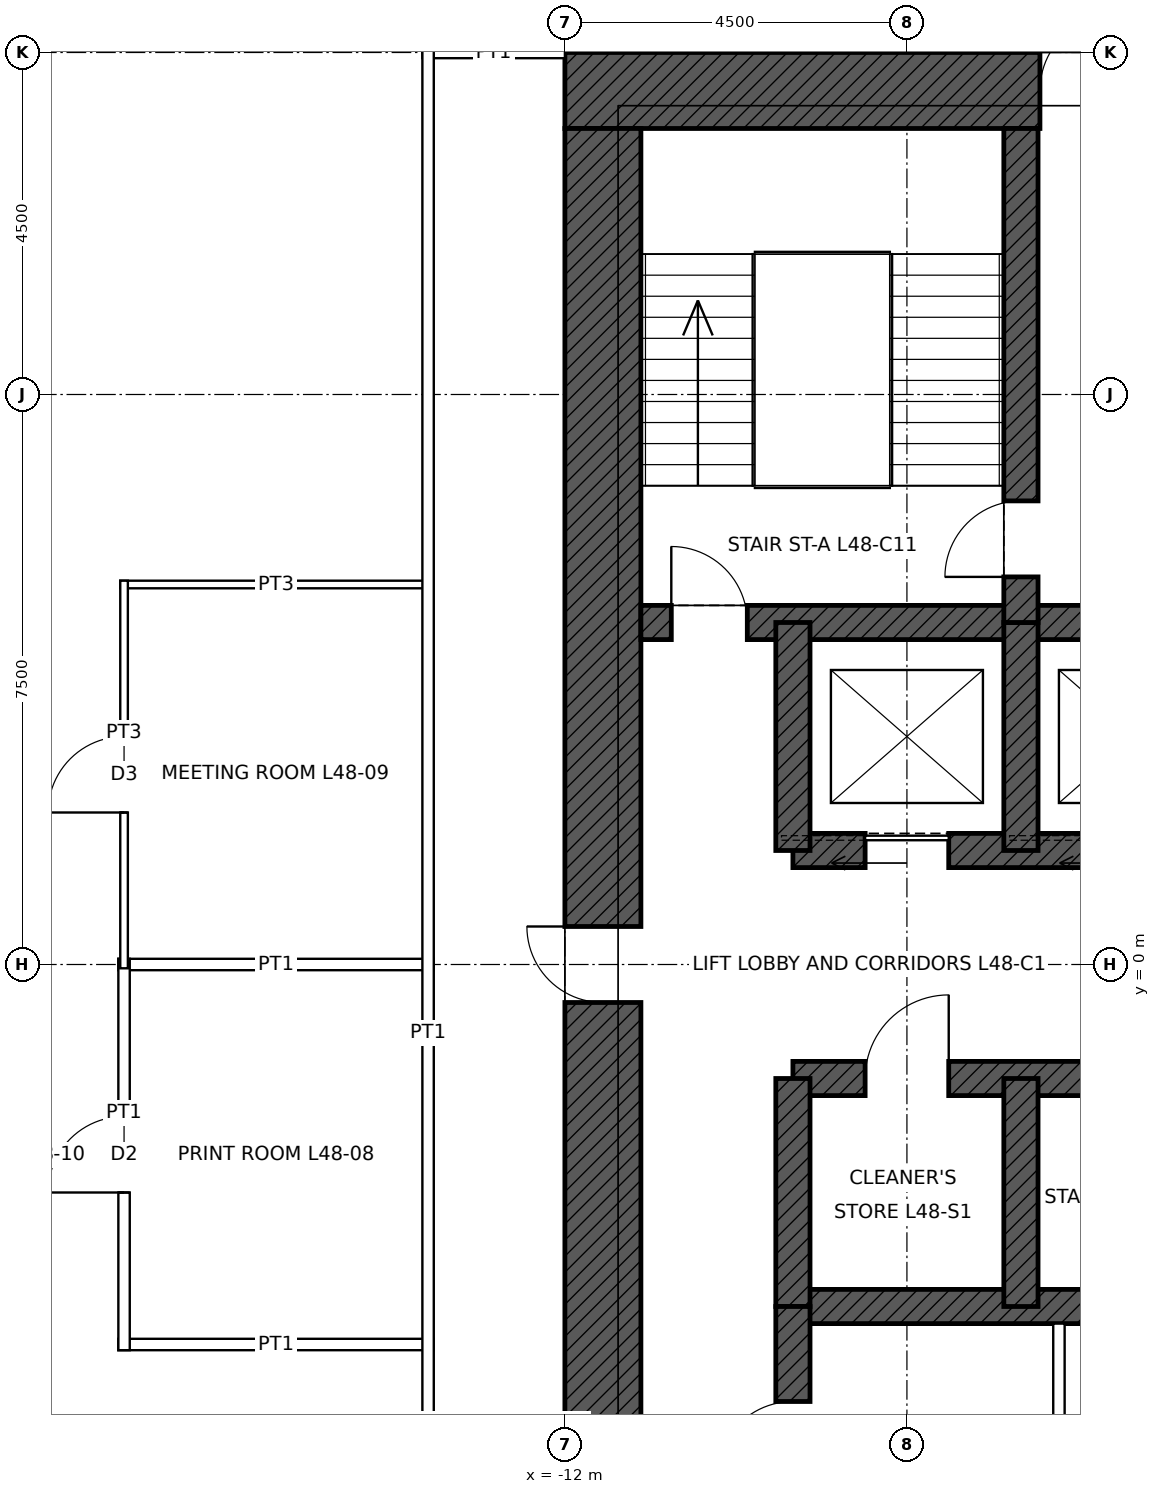
"""IFC4 building model, lengths in metres.
Left out: names, types, materials, properties, quantities, classifications, styles, units other than length and angle.
Written with IfcOpenShell. Run it as: python <this file> out.ifc"""

import sys

from ifc_helpers import new_model, si_unit, direction, frame, frame_2d, origin, place, context, subcontext, project, spatial, rectangle, extrude, element, fill, save


model = new_model("IFC4")
c1 = context("Model", 3, precision=1e-05, world=origin(), true_north=direction((0.0, 1.0)))
c2 = subcontext(c1, "Body", "Model", "MODEL_VIEW")
j1 = project(units=[si_unit("LENGTHUNIT", "METRE"), si_unit("PLANEANGLEUNIT", "RADIAN")], contexts=[c1])
p1 = place(None, origin())
s1 = spatial("IfcSite", under=j1, at=p1, CompositionType="ELEMENT")
p2 = place(p1, origin())
s2 = spatial("IfcBuilding", under=s1, at=p2, CompositionType="ELEMENT")
p3 = place(p2, frame((0.0, 0.0, 225.9)))
s3 = spatial("IfcBuildingStorey", under=s2, at=p3, CompositionType="ELEMENT", Elevation=225.9)
p4 = place(p3, frame((-12.0, 11.5, 0.0), z_axis=(0.0, 0.0, 1.0), x_axis=(1.0, 0.0, 0.0)))
e1 = element("IfcWall", 1, at=p4, inside=s3, PredefinedType="SHEAR", context=c2, shape_type="SweptSolid", body=[
    extrude(rectangle(XDim=24.0, YDim=1.0, at=frame_2d((12.0, 0.0))), origin(), (0.0, 0.0, 1.0), 4.0),
])
p5 = place(p4, frame((6.25, 0.0, 0.0)))
e2 = element("IfcOpeningElement", 2, at=p5, cuts=e1, PredefinedType="OPENING", context=c2, shape_type="SweptSolid", body=[
    extrude(rectangle(XDim=1.0, YDim=2.4, at=frame_2d((0.5, 1.2))), frame((0.0, 0.51, 0.0), z_axis=(0.0, -1.0, 0.0), x_axis=(1.0, 0.0, 0.0)), (0.0, 0.0, 1.0), 1.02),
])
p6 = place(p4, frame((16.75, 0.0, 0.0)))
e3 = element("IfcOpeningElement", 3, at=p6, cuts=e1, PredefinedType="OPENING", context=c2, shape_type="SweptSolid", body=[
    extrude(rectangle(XDim=1.0, YDim=2.4, at=frame_2d((0.5, 1.2))), frame((0.0, 0.51, 0.0), z_axis=(0.0, -1.0, 0.0), x_axis=(1.0, 0.0, 0.0)), (0.0, 0.0, 1.0), 1.02),
])
p7 = place(p3, frame((-11.5, -11.0, 0.0), z_axis=(0.0, 0.0, 1.0), x_axis=(0.0, 1.0, 0.0)))
e4 = element("IfcWall", 4, at=p7, inside=s3, PredefinedType="SHEAR", context=c2, shape_type="SweptSolid", body=[
    extrude(rectangle(XDim=22.0, YDim=1.0, at=frame_2d((11.0, 0.0))), origin(), (0.0, 0.0, 1.0), 4.0),
])
p8 = place(p7, frame((10.5, 0.0, 0.0)))
e5 = element("IfcOpeningElement", 5, at=p8, cuts=e4, PredefinedType="OPENING", context=c2, shape_type="SweptSolid", body=[
    extrude(rectangle(XDim=1.0, YDim=2.4, at=frame_2d((0.5, 1.2))), frame((0.0, 0.51, 0.0), z_axis=(0.0, -1.0, 0.0), x_axis=(1.0, 0.0, 0.0)), (0.0, 0.0, 1.0), 1.02),
])
p9 = place(p3, frame((-11.0, 4.5, 0.0), z_axis=(0.0, 0.0, 1.0), x_axis=(1.0, 0.0, 0.0)))
e6 = element("IfcWall", 6, at=p9, inside=s3, PredefinedType="SHEAR", context=c2, shape_type="SweptSolid", body=[
    extrude(rectangle(XDim=22.0, YDim=0.45, at=frame_2d((11.0, 0.0))), origin(), (0.0, 0.0, 1.0), 4.0),
])
p10 = place(p9, frame((0.4, 0.0, 0.0)))
e7 = element("IfcOpeningElement", 7, at=p10, cuts=e6, PredefinedType="OPENING", context=c2, shape_type="SweptSolid", body=[
    extrude(rectangle(XDim=1.0, YDim=2.1, at=frame_2d((0.5, 1.05))), frame((0.0, 0.235, 0.0), z_axis=(0.0, -1.0, 0.0), x_axis=(1.0, 0.0, 0.0)), (0.0, 0.0, 1.0), 0.47),
])
p11 = place(p9, frame((20.6, 0.0, 0.0)))
e8 = element("IfcOpeningElement", 8, at=p11, cuts=e6, PredefinedType="OPENING", context=c2, shape_type="SweptSolid", body=[
    extrude(rectangle(XDim=1.0, YDim=2.1, at=frame_2d((0.5, 1.05))), frame((0.0, 0.235, 0.0), z_axis=(0.0, -1.0, 0.0), x_axis=(1.0, 0.0, 0.0)), (0.0, 0.0, 1.0), 0.47),
])
p12 = place(p3, frame((-9.0, 1.5, 0.0), z_axis=(0.0, 0.0, 1.0), x_axis=(1.0, 0.0, 0.0)))
e9 = element("IfcWall", 9, at=p12, inside=s3, PredefinedType="SHEAR", context=c2, shape_type="SweptSolid", body=[
    extrude(rectangle(XDim=18.0, YDim=0.45, at=frame_2d((9.0, 0.0))), origin(), (0.0, 0.0, 1.0), 4.0),
])
p13 = place(p12, frame((0.95, 0.0, 0.0)))
e10 = element("IfcOpeningElement", 10, at=p13, cuts=e9, PredefinedType="OPENING", context=c2, shape_type="SweptSolid", body=[
    extrude(rectangle(XDim=1.1, YDim=2.1, at=frame_2d((0.55, 1.05))), frame((0.0, 0.235, 0.0), z_axis=(0.0, -1.0, 0.0), x_axis=(1.0, 0.0, 0.0)), (0.0, 0.0, 1.0), 0.47),
])
p14 = place(p12, frame((3.95, 0.0, 0.0)))
e11 = element("IfcOpeningElement", 11, at=p14, cuts=e9, PredefinedType="OPENING", context=c2, shape_type="SweptSolid", body=[
    extrude(rectangle(XDim=1.1, YDim=2.1, at=frame_2d((0.55, 1.05))), frame((0.0, 0.235, 0.0), z_axis=(0.0, -1.0, 0.0), x_axis=(1.0, 0.0, 0.0)), (0.0, 0.0, 1.0), 0.47),
])
p15 = place(p12, frame((6.95, 0.0, 0.0)))
e12 = element("IfcOpeningElement", 12, at=p15, cuts=e9, PredefinedType="OPENING", context=c2, shape_type="SweptSolid", body=[
    extrude(rectangle(XDim=1.1, YDim=2.1, at=frame_2d((0.55, 1.05))), frame((0.0, 0.235, 0.0), z_axis=(0.0, -1.0, 0.0), x_axis=(1.0, 0.0, 0.0)), (0.0, 0.0, 1.0), 0.47),
])
p16 = place(p12, frame((9.95, 0.0, 0.0)))
e13 = element("IfcOpeningElement", 13, at=p16, cuts=e9, PredefinedType="OPENING", context=c2, shape_type="SweptSolid", body=[
    extrude(rectangle(XDim=1.1, YDim=2.1, at=frame_2d((0.55, 1.05))), frame((0.0, 0.235, 0.0), z_axis=(0.0, -1.0, 0.0), x_axis=(1.0, 0.0, 0.0)), (0.0, 0.0, 1.0), 0.47),
])
p17 = place(p12, frame((12.95, 0.0, 0.0)))
e14 = element("IfcOpeningElement", 14, at=p17, cuts=e9, PredefinedType="OPENING", context=c2, shape_type="SweptSolid", body=[
    extrude(rectangle(XDim=1.1, YDim=2.1, at=frame_2d((0.55, 1.05))), frame((0.0, 0.235, 0.0), z_axis=(0.0, -1.0, 0.0), x_axis=(1.0, 0.0, 0.0)), (0.0, 0.0, 1.0), 0.47),
])
p18 = place(p12, frame((15.95, 0.0, 0.0)))
e15 = element("IfcOpeningElement", 15, at=p18, cuts=e9, PredefinedType="OPENING", context=c2, shape_type="SweptSolid", body=[
    extrude(rectangle(XDim=1.1, YDim=2.1, at=frame_2d((0.55, 1.05))), frame((0.0, 0.235, 0.0), z_axis=(0.0, -1.0, 0.0), x_axis=(1.0, 0.0, 0.0)), (0.0, 0.0, 1.0), 0.47),
])
p19 = place(p3, frame((-9.0, -1.5, 0.0), z_axis=(0.0, 0.0, 1.0), x_axis=(1.0, 0.0, 0.0)))
e16 = element("IfcWall", 16, at=p19, inside=s3, PredefinedType="SHEAR", context=c2, shape_type="SweptSolid", body=[
    extrude(rectangle(XDim=18.0, YDim=0.45, at=frame_2d((9.0, 0.0))), origin(), (0.0, 0.0, 1.0), 4.0),
])
p20 = place(p19, frame((0.95, 0.0, 0.0)))
e17 = element("IfcOpeningElement", 17, at=p20, cuts=e16, PredefinedType="OPENING", context=c2, shape_type="SweptSolid", body=[
    extrude(rectangle(XDim=1.1, YDim=2.1, at=frame_2d((0.55, 1.05))), frame((0.0, 0.235, 0.0), z_axis=(0.0, -1.0, 0.0), x_axis=(1.0, 0.0, 0.0)), (0.0, 0.0, 1.0), 0.47),
])
p21 = place(p19, frame((3.95, 0.0, 0.0)))
e18 = element("IfcOpeningElement", 18, at=p21, cuts=e16, PredefinedType="OPENING", context=c2, shape_type="SweptSolid", body=[
    extrude(rectangle(XDim=1.1, YDim=2.1, at=frame_2d((0.55, 1.05))), frame((0.0, 0.235, 0.0), z_axis=(0.0, -1.0, 0.0), x_axis=(1.0, 0.0, 0.0)), (0.0, 0.0, 1.0), 0.47),
])
p22 = place(p19, frame((6.95, 0.0, 0.0)))
e19 = element("IfcOpeningElement", 19, at=p22, cuts=e16, PredefinedType="OPENING", context=c2, shape_type="SweptSolid", body=[
    extrude(rectangle(XDim=1.1, YDim=2.1, at=frame_2d((0.55, 1.05))), frame((0.0, 0.235, 0.0), z_axis=(0.0, -1.0, 0.0), x_axis=(1.0, 0.0, 0.0)), (0.0, 0.0, 1.0), 0.47),
])
p23 = place(p3, frame((-9.0, -4.5, 0.0), z_axis=(0.0, 0.0, 1.0), x_axis=(1.0, 0.0, 0.0)))
e20 = element("IfcWall", 20, at=p23, inside=s3, PredefinedType="SHEAR", context=c2, shape_type="SweptSolid", body=[
    extrude(rectangle(XDim=18.0, YDim=0.45, at=frame_2d((9.0, 0.0))), origin(), (0.0, 0.0, 1.0), 4.0),
])
for number, where, z_axis, x_axis in (
    (21, (-9.0, 1.5, 0.0), (0.0, 0.0, 1.0), (0.0, 1.0, 0.0)),
    (22, (-9.0, -4.5, 0.0), (0.0, 0.0, 1.0), (0.0, 1.0, 0.0)),
    (23, (-6.0, 1.5, 0.0), (0.0, 0.0, 1.0), (0.0, 1.0, 0.0)),
    (24, (-6.0, -4.5, 0.0), (0.0, 0.0, 1.0), (0.0, 1.0, 0.0)),
):
    element("IfcWall", number, at=place(p3, frame(where, z_axis=z_axis, x_axis=x_axis)), inside=s3, PredefinedType="SHEAR", context=c2, shape_type="SweptSolid", body=[
        extrude(rectangle(XDim=3.0, YDim=0.45, at=frame_2d((1.5, 0.0))), origin(), (0.0, 0.0, 1.0), 4.0),
    ])
p24 = place(p3, frame((-6.0, 4.5, 0.0), z_axis=(0.0, 0.0, 1.0), x_axis=(0.0, 1.0, 0.0)))
e25 = element("IfcWall", 25, at=p24, inside=s3, PredefinedType="SHEAR", context=c2, shape_type="SweptSolid", body=[
    extrude(rectangle(XDim=6.5, YDim=0.45, at=frame_2d((3.25, 0.0))), origin(), (0.0, 0.0, 1.0), 4.0),
])
p25 = place(p24, frame((0.6, 0.0, 0.0)))
e26 = element("IfcOpeningElement", 26, at=p25, cuts=e25, PredefinedType="OPENING", context=c2, shape_type="SweptSolid", body=[
    extrude(rectangle(XDim=1.0, YDim=2.1, at=frame_2d((0.5, 1.05))), frame((0.0, 0.235, 0.0), z_axis=(0.0, -1.0, 0.0), x_axis=(1.0, 0.0, 0.0)), (0.0, 0.0, 1.0), 0.47),
])
p26 = place(p3, frame((-9.0, -11.0, 0.0), z_axis=(0.0, 0.0, 1.0), x_axis=(0.0, 1.0, 0.0)))
e27 = element("IfcWall", 27, at=p26, inside=s3, PredefinedType="SHEAR", context=c2, shape_type="SweptSolid", body=[
    extrude(rectangle(XDim=6.5, YDim=0.45, at=frame_2d((3.25, 0.0))), origin(), (0.0, 0.0, 1.0), 4.0),
])
p27 = place(p26, frame((4.25, 0.0, 0.0)))
e28 = element("IfcOpeningElement", 28, at=p27, cuts=e27, PredefinedType="OPENING", context=c2, shape_type="SweptSolid", body=[
    extrude(rectangle(XDim=1.0, YDim=2.1, at=frame_2d((0.5, 1.05))), frame((0.0, 0.235, 0.0), z_axis=(0.0, -1.0, 0.0), x_axis=(1.0, 0.0, 0.0)), (0.0, 0.0, 1.0), 0.47),
])
p28 = place(p3, frame((-17.875, -5.0, 0.0), z_axis=(0.0, 0.0, 1.0), x_axis=(1.0, 0.0, 0.0)))
e29 = element("IfcWall", 29, at=p28, inside=s3, PredefinedType="PARTITIONING", context=c2, shape_type="SweptSolid", body=[
    extrude(rectangle(XDim=4.15, YDim=0.15, at=frame_2d((2.075, 0.0))), origin(), (0.0, 0.0, 1.0), 3.85),
])
p29 = place(p3, frame((-17.875, 0.0, 0.0), z_axis=(0.0, 0.0, 1.0), x_axis=(1.0, 0.0, 0.0)))
e30 = element("IfcWall", 30, at=p29, inside=s3, PredefinedType="PARTITIONING", context=c2, shape_type="SweptSolid", body=[
    extrude(rectangle(XDim=4.15, YDim=0.15, at=frame_2d((2.075, 0.0))), origin(), (0.0, 0.0, 1.0), 3.238),
])
p30 = place(p3, frame((-17.85, 5.0, 0.0), z_axis=(0.0, 0.0, 1.0), x_axis=(1.0, 0.0, 0.0)))
e31 = element("IfcWall", 31, at=p30, inside=s3, PredefinedType="PARTITIONING", context=c2, shape_type="SweptSolid", body=[
    extrude(rectangle(XDim=4.1, YDim=0.1, at=frame_2d((2.05, 0.0))), origin(), (0.0, 0.0, 1.0), 3.85),
])
p31 = place(p3, frame((-13.875, 12.0, 0.0), z_axis=(0.0, 0.0, 1.0), x_axis=(1.0, 0.0, 0.0)))
e32 = element("IfcWall", 32, at=p31, inside=s3, PredefinedType="PARTITIONING", context=c2, shape_type="SweptSolid", body=[
    extrude(rectangle(XDim=1.875, YDim=0.15, at=frame_2d((0.938, 0.0))), origin(), (0.0, 0.0, 1.0), 3.85),
])
p32 = place(p3, frame((-17.8, -5.075, 0.0), z_axis=(0.0, 0.0, 1.0), x_axis=(0.0, 1.0, 0.0)))
e33 = element("IfcWall", 33, at=p32, inside=s3, PredefinedType="PARTITIONING", context=c2, shape_type="SweptSolid", body=[
    extrude(rectangle(XDim=5.15, YDim=0.15, at=frame_2d((2.575, 0.0))), origin(), (0.0, 0.0, 1.0), 3.85),
])
p33 = place(p32, frame((2.075, 0.0, 0.0)))
e34 = element("IfcOpeningElement", 34, at=p33, cuts=e33, PredefinedType="OPENING", context=c2, shape_type="SweptSolid", body=[
    extrude(rectangle(XDim=1.0, YDim=2.1, at=frame_2d((0.5, 1.05))), frame((0.0, 0.085, 0.0), z_axis=(0.0, -1.0, 0.0), x_axis=(1.0, 0.0, 0.0)), (0.0, 0.0, 1.0), 0.17),
])
p34 = place(p3, frame((-17.8, -0.05, 0.0), z_axis=(0.0, 0.0, 1.0), x_axis=(0.0, 1.0, 0.0)))
e35 = element("IfcWall", 35, at=p34, inside=s3, PredefinedType="PARTITIONING", context=c2, shape_type="SweptSolid", body=[
    extrude(rectangle(XDim=5.1, YDim=0.1, at=frame_2d((2.55, 0.0))), origin(), (0.0, 0.0, 1.0), 3.85),
])
p35 = place(p34, frame((2.05, 0.0, 0.0)))
e36 = element("IfcOpeningElement", 36, at=p35, cuts=e35, PredefinedType="OPENING", context=c2, shape_type="SweptSolid", body=[
    extrude(rectangle(XDim=1.0, YDim=2.1, at=frame_2d((0.5, 1.05))), frame((0.0, 0.06, 0.0), z_axis=(0.0, -1.0, 0.0), x_axis=(1.0, 0.0, 0.0)), (0.0, 0.0, 1.0), 0.12),
])
p36 = place(p3, frame((-13.8, -13.875, 0.0), z_axis=(0.0, 0.0, 1.0), x_axis=(0.0, 1.0, 0.0)))
e37 = element("IfcWall", 37, at=p36, inside=s3, PredefinedType="PARTITIONING", context=c2, shape_type="SweptSolid", body=[
    extrude(rectangle(XDim=25.95, YDim=0.15, at=frame_2d((12.975, 0.0))), origin(), (0.0, 0.0, 1.0), 3.85),
])
p37 = place(p3, frame((-5.5, -11.0, 0.0), z_axis=(0.0, 0.0, 1.0), x_axis=(0.0, 1.0, 0.0)))
e38 = element("IfcWall", 38, at=p37, inside=s3, PredefinedType="PARTITIONING", context=c2, shape_type="SweptSolid", body=[
    extrude(rectangle(XDim=6.275, YDim=0.15, at=frame_2d((3.137, 0.0))), origin(), (0.0, 0.0, 1.0), 3.75),
])
p38 = place(p37, frame((2.637, 0.0, 0.0)))
e39 = element("IfcOpeningElement", 39, at=p38, cuts=e38, PredefinedType="OPENING", context=c2, shape_type="SweptSolid", body=[
    extrude(rectangle(XDim=1.0, YDim=2.1, at=frame_2d((0.5, 1.05))), frame((0.0, 0.085, 0.0), z_axis=(0.0, -1.0, 0.0), x_axis=(1.0, 0.0, 0.0)), (0.0, 0.0, 1.0), 0.17),
])
p39 = place(p10, origin())
e40 = element("IfcDoor", 40, at=p39, inside=s3, OperationType="SINGLE_SWING_LEFT", PredefinedType="DOOR", context=c2, shape_type="SweptSolid", body=[
    extrude(rectangle(XDim=1.0, YDim=2.1, at=frame_2d((0.5, 1.05))), frame((0.0, 0.025, 0.0), z_axis=(0.0, -1.0, 0.0), x_axis=(1.0, 0.0, 0.0)), (0.0, 0.0, 1.0), 0.05),
])
fill(e7, e40)
p40 = place(p25, origin())
e41 = element("IfcDoor", 41, at=p40, inside=s3, OperationType="SINGLE_SWING_LEFT", PredefinedType="DOOR", context=c2, shape_type="SweptSolid", body=[
    extrude(rectangle(XDim=1.0, YDim=2.1, at=frame_2d((0.5, 1.05))), frame((0.0, 0.025, 0.0), z_axis=(0.0, -1.0, 0.0), x_axis=(1.0, 0.0, 0.0)), (0.0, 0.0, 1.0), 0.05),
])
fill(e26, e41)
p41 = place(p5, origin())
e42 = element("IfcDoor", 42, at=p41, inside=s3, OperationType="SINGLE_SWING_RIGHT", PredefinedType="DOOR", context=c2, shape_type="SweptSolid", body=[
    extrude(rectangle(XDim=1.0, YDim=2.4, at=frame_2d((0.5, 1.2))), frame((0.0, 0.485, 0.0), z_axis=(0.0, -1.0, 0.0), x_axis=(1.0, 0.0, 0.0)), (0.0, 0.0, 1.0), 0.05),
])
fill(e2, e42)
p42 = place(p8, origin())
e43 = element("IfcDoor", 43, at=p42, inside=s3, OperationType="SINGLE_SWING_RIGHT", PredefinedType="DOOR", context=c2, shape_type="SweptSolid", body=[
    extrude(rectangle(XDim=1.0, YDim=2.4, at=frame_2d((0.5, 1.2))), frame((0.0, 0.485, 0.0), z_axis=(0.0, -1.0, 0.0), x_axis=(1.0, 0.0, 0.0)), (0.0, 0.0, 1.0), 0.05),
])
fill(e5, e43)
p43 = place(p27, origin())
e44 = element("IfcDoor", 44, at=p43, inside=s3, OperationType="SINGLE_SWING_LEFT", PredefinedType="DOOR", context=c2, shape_type="SweptSolid", body=[
    extrude(rectangle(XDim=1.0, YDim=2.1, at=frame_2d((0.5, 1.05))), frame((0.0, 0.025, 0.0), z_axis=(0.0, -1.0, 0.0), x_axis=(1.0, 0.0, 0.0)), (0.0, 0.0, 1.0), 0.05),
])
fill(e28, e44)
p44 = place(p13, origin())
e45 = element("IfcDoor", 45, at=p44, inside=s3, OperationType="SLIDING_TO_LEFT", PredefinedType="DOOR", context=c2, shape_type="SweptSolid", body=[
    extrude(rectangle(XDim=1.1, YDim=2.1, at=frame_2d((0.55, 1.05))), frame((0.0, 0.025, 0.0), z_axis=(0.0, -1.0, 0.0), x_axis=(1.0, 0.0, 0.0)), (0.0, 0.0, 1.0), 0.05),
])
fill(e10, e45)
p45 = place(p20, origin())
e46 = element("IfcDoor", 46, at=p45, inside=s3, OperationType="SINGLE_SWING_RIGHT", PredefinedType="DOOR", context=c2, shape_type="SweptSolid", body=[
    extrude(rectangle(XDim=1.1, YDim=2.1, at=frame_2d((0.55, 1.05))), frame((0.0, 0.025, 0.0), z_axis=(0.0, -1.0, 0.0), x_axis=(1.0, 0.0, 0.0)), (0.0, 0.0, 1.0), 0.05),
])
fill(e17, e46)
p46 = place(p33, origin())
e47 = element("IfcDoor", 47, at=p46, inside=s3, OperationType="SINGLE_SWING_LEFT", PredefinedType="DOOR", context=c2, shape_type="SweptSolid", body=[
    extrude(rectangle(XDim=1.0, YDim=2.1, at=frame_2d((0.5, 1.05))), frame((0.0, 0.025, 0.0), z_axis=(0.0, -1.0, 0.0), x_axis=(1.0, 0.0, 0.0)), (0.0, 0.0, 1.0), 0.05),
])
fill(e34, e47)
p47 = place(p35, origin())
e48 = element("IfcDoor", 48, at=p47, inside=s3, OperationType="SINGLE_SWING_LEFT", PredefinedType="DOOR", context=c2, shape_type="SweptSolid", body=[
    extrude(rectangle(XDim=1.0, YDim=2.1, at=frame_2d((0.5, 1.05))), frame((0.0, 0.025, 0.0), z_axis=(0.0, -1.0, 0.0), x_axis=(1.0, 0.0, 0.0)), (0.0, 0.0, 1.0), 0.05),
])
fill(e36, e48)
save(model, sys.argv[1])
